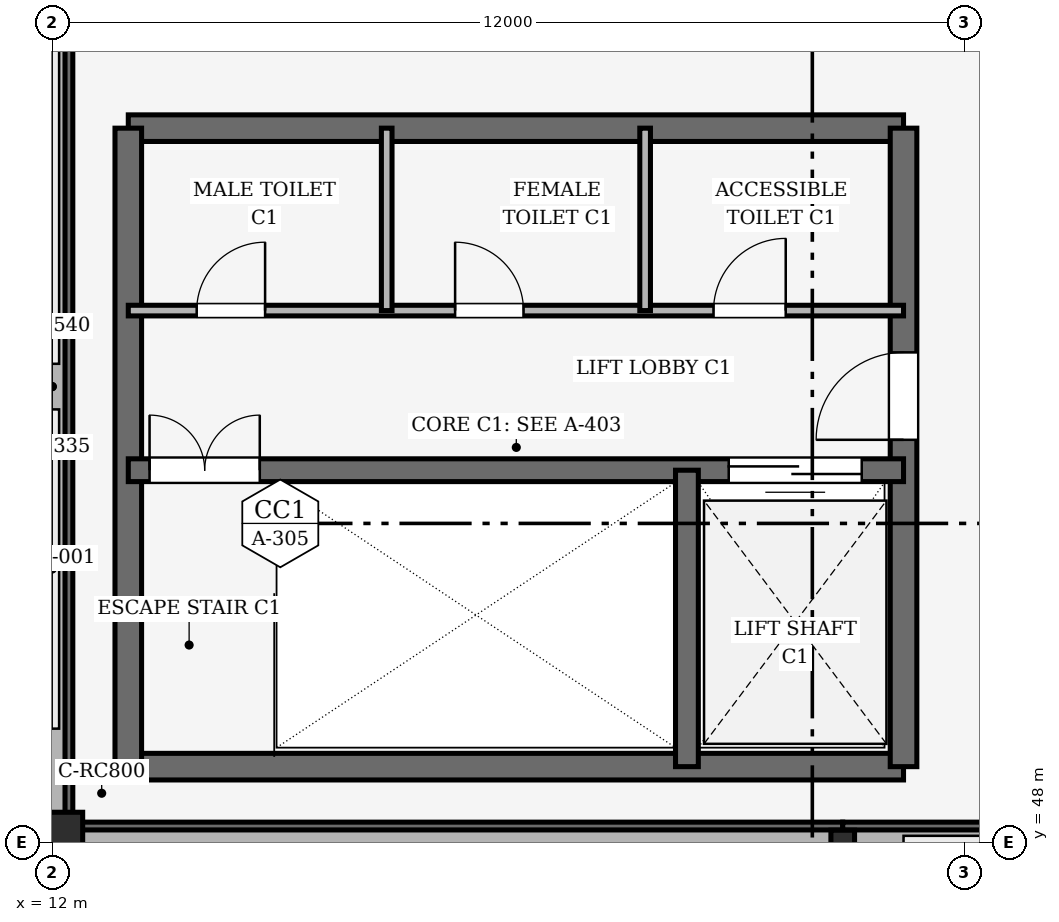
"""IFC4 building model, lengths in metres.
Left out: names, types, materials, properties, quantities, classifications, styles, units other than length and angle.
Written with IfcOpenShell. Run it as: python <this file> out.ifc"""

import sys

from ifc_helpers import new_model, si_unit, direction, frame, frame_2d, origin, origin_2d, place, context, subcontext, project, spatial, rectangle, i_section, extrude, element, fill, save


model = new_model("IFC4")
c1 = context("Model", 3, precision=1e-05, world=origin(), true_north=direction((0.0, 1.0)))
c2 = subcontext(c1, "Body", "Model", "MODEL_VIEW")
j1 = project(units=[si_unit("LENGTHUNIT", "METRE"), si_unit("PLANEANGLEUNIT", "RADIAN")], contexts=[c1])
p1 = place(None, origin())
s1 = spatial("IfcSite", under=j1, at=p1, CompositionType="ELEMENT")
p2 = place(p1, origin())
s2 = spatial("IfcBuilding", under=s1, at=p2, CompositionType="ELEMENT")
p3 = place(p2, frame((0.0, 0.0, 10.8)))
s3 = spatial("IfcBuildingStorey", under=s2, at=p3, CompositionType="ELEMENT", Elevation=10.8)
p4 = place(p3, frame((12.0, 48.0, 0.0), z_axis=(0.0, 0.0, 1.0), x_axis=(1.0, 0.0, 0.0)))
e1 = element("IfcColumn", 1, at=p4, inside=s3, PredefinedType="COLUMN", context=c2, shape_type="SweptSolid", body=[
    extrude(rectangle(XDim=0.8, YDim=0.8, at=origin_2d()), origin(), (0.0, 0.0, 1.0), 8.5),
])
p5 = place(p3, frame((22.4, 48.0, 0.0), z_axis=(0.0, 0.0, 1.0), x_axis=(1.0, 0.0, 0.0)))
e2 = element("IfcColumn", 2, at=p5, inside=s3, PredefinedType="COLUMN", context=c2, shape_type="SweptSolid", body=[
    extrude(i_section(OverallWidth=0.311, OverallDepth=0.327, WebThickness=0.016, FlangeThickness=0.025, FilletRadius=0.015, at=origin_2d()), origin(), (0.0, 0.0, 1.0), 6.7),
])
p6 = place(p3, frame((12.0, 60.0, 0.0), z_axis=(0.0, 0.0, 1.0), x_axis=(0.0, -1.0, 0.0)))
e3 = element("IfcWall", 3, at=p6, inside=s3, PredefinedType="SOLIDWALL", context=c2, shape_type="SweptSolid", body=[
    extrude(rectangle(XDim=12.0, YDim=0.54, at=frame_2d((6.0, 0.0))), origin(), (0.0, 0.0, 1.0), 4.6),
])
p7 = place(p3, frame((12.0, 48.0, 0.0), z_axis=(0.0, 0.0, 1.0), x_axis=(1.0, 0.0, 0.0)))
e4 = element("IfcWall", 4, at=p7, inside=s3, PredefinedType="SOLIDWALL", context=c2, shape_type="SweptSolid", body=[
    extrude(rectangle(XDim=10.4, YDim=0.54, at=frame_2d((5.2, 0.0))), origin(), (0.0, 0.0, 1.0), 8.4),
])
p8 = place(p3, frame((22.4, 48.0, 0.0), z_axis=(0.0, 0.0, 1.0), x_axis=(1.0, 0.0, 0.0)))
e5 = element("IfcWall", 5, at=p8, inside=s3, PredefinedType="SOLIDWALL", context=c2, shape_type="SweptSolid", body=[
    extrude(rectangle(XDim=33.2, YDim=0.54, at=frame_2d((16.6, 0.0))), origin(), (0.0, 0.0, 1.0), 1.25),
])
p9 = place(p3, frame((12.0, 60.0, 7.0), z_axis=(0.0, 0.0, 1.0), x_axis=(0.0, -1.0, 0.0)))
e6 = element("IfcWall", 6, at=p9, inside=s3, PredefinedType="SOLIDWALL", context=c2, shape_type="SweptSolid", body=[
    extrude(rectangle(XDim=12.0, YDim=0.335, at=frame_2d((6.0, 0.0))), origin(), (0.0, 0.0, 1.0), 3.85),
])
p10 = place(p3, frame((12.0, 48.0, 8.4), z_axis=(0.0, 0.0, 1.0), x_axis=(1.0, 0.0, 0.0)))
e7 = element("IfcWall", 7, at=p10, inside=s3, PredefinedType="SOLIDWALL", context=c2, shape_type="SweptSolid", body=[
    extrude(rectangle(XDim=10.4, YDim=0.335, at=frame_2d((5.2, 0.0))), origin(), (0.0, 0.0, 1.0), 2.526),
])
p11 = place(p3, frame((22.4, 48.0, 6.65), z_axis=(0.0, 0.0, 1.0), x_axis=(1.0, 0.0, 0.0)))
e8 = element("IfcWall", 8, at=p11, inside=s3, PredefinedType="SOLIDWALL", context=c2, shape_type="SweptSolid", body=[
    extrude(rectangle(XDim=33.2, YDim=0.335, at=frame_2d((16.6, 0.0))), origin(), (0.0, 0.0, 1.0), 3.35),
])
for number, where, z_axis, x_axis in (
    (9, (13.0, 49.0, 0.0), (0.0, 0.0, 1.0), (1.0, 0.0, 0.0)),
    (10, (23.2, 57.4, 0.0), (0.0, 0.0, 1.0), (-1.0, 0.0, 0.0)),
):
    element("IfcWall", number, at=place(p3, frame(where, z_axis=z_axis, x_axis=x_axis)), inside=s3, PredefinedType="SHEAR", context=c2, shape_type="SweptSolid", body=[
        extrude(rectangle(XDim=10.2, YDim=0.35, at=frame_2d((5.1, 0.0))), origin(), (0.0, 0.0, 1.0), 5.4),
    ])
p12 = place(p3, frame((13.0, 57.4, 0.0), z_axis=(0.0, 0.0, 1.0), x_axis=(0.0, -1.0, 0.0)))
e11 = element("IfcWall", 11, at=p12, inside=s3, PredefinedType="SHEAR", context=c2, shape_type="SweptSolid", body=[
    extrude(rectangle(XDim=8.4, YDim=0.35, at=frame_2d((4.2, 0.0))), origin(), (0.0, 0.0, 1.0), 5.4),
])
p13 = place(p3, frame((23.2, 49.0, 0.0), z_axis=(0.0, 0.0, 1.0), x_axis=(0.0, 1.0, 0.0)))
e12 = element("IfcWall", 12, at=p13, inside=s3, PredefinedType="SHEAR", context=c2, shape_type="SweptSolid", body=[
    extrude(rectangle(XDim=8.4, YDim=0.35, at=frame_2d((4.2, 0.0))), origin(), (0.0, 0.0, 1.0), 5.4),
])
p14 = place(p13, frame((4.3, 0.0, 0.0)))
e13 = element("IfcOpeningElement", 13, at=p14, cuts=e12, PredefinedType="OPENING", context=c2, shape_type="SweptSolid", body=[
    extrude(rectangle(XDim=1.15, YDim=2.15, at=frame_2d((0.575, 1.075))), frame((0.0, 0.185, 0.0), z_axis=(0.0, -1.0, 0.0), x_axis=(1.0, 0.0, 0.0)), (0.0, 0.0, 1.0), 0.37),
])
p15 = place(p3, frame((13.0, 52.9, 0.0), z_axis=(0.0, 0.0, 1.0), x_axis=(1.0, 0.0, 0.0)))
e14 = element("IfcWall", 14, at=p15, inside=s3, PredefinedType="SHEAR", context=c2, shape_type="SweptSolid", body=[
    extrude(rectangle(XDim=10.2, YDim=0.3, at=frame_2d((5.1, 0.0))), origin(), (0.0, 0.0, 1.0), 5.4),
])
p16 = place(p15, frame((0.28, 0.0, 0.0)))
e15 = element("IfcOpeningElement", 15, at=p16, cuts=e14, PredefinedType="OPENING", context=c2, shape_type="SweptSolid", body=[
    extrude(rectangle(XDim=1.45, YDim=2.15, at=frame_2d((0.725, 1.075))), frame((0.0, 0.16, 0.0), z_axis=(0.0, -1.0, 0.0), x_axis=(1.0, 0.0, 0.0)), (0.0, 0.0, 1.0), 0.32),
])
p17 = place(p15, frame((7.9, 0.0, 0.0)))
e16 = element("IfcOpeningElement", 16, at=p17, cuts=e14, PredefinedType="OPENING", context=c2, shape_type="SweptSolid", body=[
    extrude(rectangle(XDim=1.75, YDim=2.3, at=frame_2d((0.875, 1.15))), frame((0.0, 0.16, 0.0), z_axis=(0.0, -1.0, 0.0), x_axis=(1.0, 0.0, 0.0)), (0.0, 0.0, 1.0), 0.32),
])
p18 = place(p3, frame((20.35, 49.0, 0.0), z_axis=(0.0, 0.0, 1.0), x_axis=(0.0, 1.0, 0.0)))
e17 = element("IfcWall", 17, at=p18, inside=s3, PredefinedType="SHEAR", context=c2, shape_type="SweptSolid", body=[
    extrude(rectangle(XDim=3.9, YDim=0.3, at=frame_2d((1.95, 0.0))), origin(), (0.0, 0.0, 1.0), 5.4),
])
p19 = place(p3, frame((13.0, 55.0, 0.0), z_axis=(0.0, 0.0, 1.0), x_axis=(1.0, 0.0, 0.0)))
e18 = element("IfcWall", 18, at=p19, inside=s3, PredefinedType="PARTITIONING", context=c2, shape_type="SweptSolid", body=[
    extrude(rectangle(XDim=10.2, YDim=0.14, at=frame_2d((5.1, 0.0))), origin(), (0.0, 0.0, 1.0), 4.5),
])
p20 = place(p19, frame((0.9, 0.0, 0.0)))
e19 = element("IfcOpeningElement", 19, at=p20, cuts=e18, PredefinedType="OPENING", context=c2, shape_type="SweptSolid", body=[
    extrude(rectangle(XDim=0.9, YDim=2.1, at=frame_2d((0.45, 1.05))), frame((0.0, 0.08, 0.0), z_axis=(0.0, -1.0, 0.0), x_axis=(1.0, 0.0, 0.0)), (0.0, 0.0, 1.0), 0.16),
])
p21 = place(p19, frame((4.3, 0.0, 0.0)))
e20 = element("IfcOpeningElement", 20, at=p21, cuts=e18, PredefinedType="OPENING", context=c2, shape_type="SweptSolid", body=[
    extrude(rectangle(XDim=0.9, YDim=2.1, at=frame_2d((0.45, 1.05))), frame((0.0, 0.08, 0.0), z_axis=(0.0, -1.0, 0.0), x_axis=(1.0, 0.0, 0.0)), (0.0, 0.0, 1.0), 0.16),
])
p22 = place(p19, frame((7.7, 0.0, 0.0)))
e21 = element("IfcOpeningElement", 21, at=p22, cuts=e18, PredefinedType="OPENING", context=c2, shape_type="SweptSolid", body=[
    extrude(rectangle(XDim=0.95, YDim=2.1, at=frame_2d((0.475, 1.05))), frame((0.0, 0.08, 0.0), z_axis=(0.0, -1.0, 0.0), x_axis=(1.0, 0.0, 0.0)), (0.0, 0.0, 1.0), 0.16),
])
for number, where, z_axis, x_axis in (
    (22, (16.4, 55.0, 0.0), (0.0, 0.0, 1.0), (0.0, 1.0, 0.0)),
    (23, (19.8, 55.0, 0.0), (0.0, 0.0, 1.0), (0.0, 1.0, 0.0)),
):
    element("IfcWall", number, at=place(p3, frame(where, z_axis=z_axis, x_axis=x_axis)), inside=s3, PredefinedType="PARTITIONING", context=c2, shape_type="SweptSolid", body=[
        extrude(rectangle(XDim=2.4, YDim=0.14, at=frame_2d((1.2, 0.0))), origin(), (0.0, 0.0, 1.0), 4.5),
    ])
p23 = place(p14, origin())
e24 = element("IfcDoor", 24, at=p23, inside=s3, OperationType="SINGLE_SWING_LEFT", PredefinedType="DOOR", context=c2, shape_type="SweptSolid", body=[
    extrude(rectangle(XDim=1.15, YDim=2.15, at=frame_2d((0.575, 1.075))), frame((0.0, 0.025, 0.0), z_axis=(0.0, -1.0, 0.0), x_axis=(1.0, 0.0, 0.0)), (0.0, 0.0, 1.0), 0.05),
])
fill(e13, e24)
p24 = place(p16, origin())
e25 = element("IfcDoor", 25, at=p24, inside=s3, OperationType="DOUBLE_DOOR_SINGLE_SWING", PredefinedType="DOOR", context=c2, shape_type="SweptSolid", body=[
    extrude(rectangle(XDim=1.45, YDim=2.15, at=frame_2d((0.725, 1.075))), frame((0.0, 0.025, 0.0), z_axis=(0.0, -1.0, 0.0), x_axis=(1.0, 0.0, 0.0)), (0.0, 0.0, 1.0), 0.05),
])
fill(e15, e25)
p25 = place(p17, origin())
e26 = element("IfcDoor", 26, at=p25, inside=s3, OperationType="DOUBLE_DOOR_SLIDING", PredefinedType="DOOR", context=c2, shape_type="SweptSolid", body=[
    extrude(rectangle(XDim=1.75, YDim=2.3, at=frame_2d((0.875, 1.15))), frame((0.0, 0.025, 0.0), z_axis=(0.0, -1.0, 0.0), x_axis=(1.0, 0.0, 0.0)), (0.0, 0.0, 1.0), 0.05),
])
fill(e16, e26)
p26 = place(p20, origin())
e27 = element("IfcDoor", 27, at=p26, inside=s3, OperationType="SINGLE_SWING_RIGHT", PredefinedType="DOOR", context=c2, shape_type="SweptSolid", body=[
    extrude(rectangle(XDim=0.9, YDim=2.1, at=frame_2d((0.45, 1.05))), frame((0.0, 0.025, 0.0), z_axis=(0.0, -1.0, 0.0), x_axis=(1.0, 0.0, 0.0)), (0.0, 0.0, 1.0), 0.05),
])
fill(e19, e27)
p27 = place(p21, origin())
e28 = element("IfcDoor", 28, at=p27, inside=s3, OperationType="SINGLE_SWING_LEFT", PredefinedType="DOOR", context=c2, shape_type="SweptSolid", body=[
    extrude(rectangle(XDim=0.9, YDim=2.1, at=frame_2d((0.45, 1.05))), frame((0.0, 0.025, 0.0), z_axis=(0.0, -1.0, 0.0), x_axis=(1.0, 0.0, 0.0)), (0.0, 0.0, 1.0), 0.05),
])
fill(e20, e28)
p28 = place(p22, origin())
e29 = element("IfcDoor", 29, at=p28, inside=s3, OperationType="SINGLE_SWING_RIGHT", PredefinedType="DOOR", context=c2, shape_type="SweptSolid", body=[
    extrude(rectangle(XDim=0.95, YDim=2.1, at=frame_2d((0.475, 1.05))), frame((0.0, 0.025, 0.0), z_axis=(0.0, -1.0, 0.0), x_axis=(1.0, 0.0, 0.0)), (0.0, 0.0, 1.0), 0.05),
])
fill(e21, e29)
save(model, sys.argv[1])
